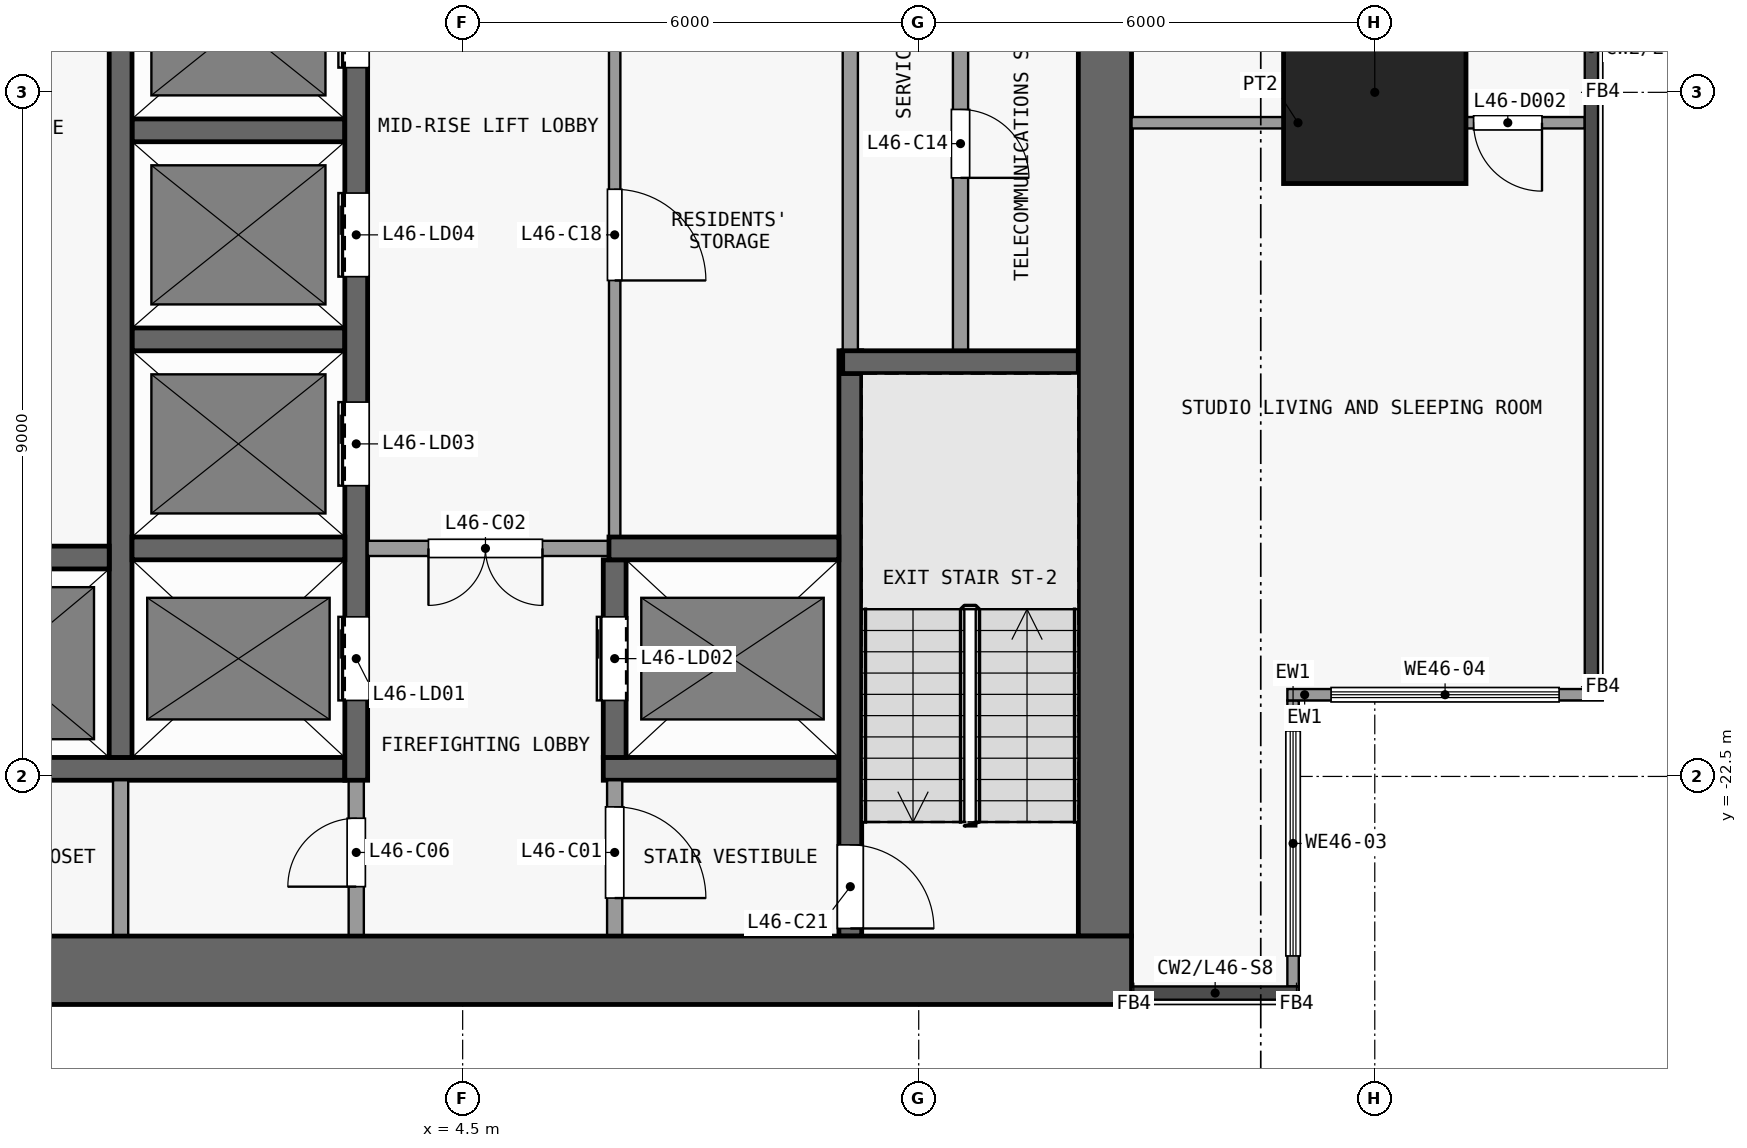
"""IFC4 building model, lengths in metres.
Left out: names, types, materials, properties, quantities, classifications, styles, units other than length and angle.
Written with IfcOpenShell. Run it as: python <this file> out.ifc"""

import sys

from ifc_helpers import new_model, si_unit, direction, frame, frame_2d, origin, origin_2d, place, context, subcontext, project, spatial, rectangle, extrude, element, fill, save


model = new_model("IFC4")
c1 = context("Model", 3, precision=1e-05, world=origin(), true_north=direction((0.0, 1.0)))
c2 = subcontext(c1, "Body", "Model", "MODEL_VIEW")
j1 = project(units=[si_unit("LENGTHUNIT", "METRE"), si_unit("PLANEANGLEUNIT", "RADIAN")], contexts=[c1])
p1 = place(None, origin())
s1 = spatial("IfcSite", under=j1, at=p1, CompositionType="ELEMENT")
p2 = place(p1, origin())
s2 = spatial("IfcBuilding", under=s1, at=p2, CompositionType="ELEMENT")
p3 = place(p2, frame((0.0, 0.0, 185.3)))
s3 = spatial("IfcBuildingStorey", under=s2, at=p3, CompositionType="ELEMENT", Elevation=185.3)
p4 = place(p3, frame((16.5, -13.5, 0.0), z_axis=(0.0, 0.0, 1.0), x_axis=(1.0, 0.0, 0.0)))
e1 = element("IfcColumn", 1, at=p4, inside=s3, PredefinedType="COLUMN", context=c2, shape_type="SweptSolid", body=[
    extrude(rectangle(XDim=2.4, YDim=2.4, at=origin_2d()), origin(), (0.0, 0.0, 1.0), 3.6),
])
p5 = place(p3, frame((-13.3, -25.05, 0.0), z_axis=(0.0, 0.0, 1.0), x_axis=(1.0, 0.0, 0.0)))
e2 = element("IfcWall", 2, at=p5, inside=s3, PredefinedType="SHEAR", context=c2, shape_type="SweptSolid", body=[
    extrude(rectangle(XDim=26.6, YDim=0.9, at=frame_2d((13.3, 0.0))), origin(), (0.0, 0.0, 1.0), 3.3),
])
p6 = place(p3, frame((12.95, -24.6, 0.0), z_axis=(0.0, 0.0, 1.0), x_axis=(0.0, 1.0, 0.0)))
e3 = element("IfcWall", 3, at=p6, inside=s3, PredefinedType="SHEAR", context=c2, shape_type="SweptSolid", body=[
    extrude(rectangle(XDim=16.1, YDim=0.7, at=frame_2d((8.05, 0.0))), origin(), (0.0, 0.0, 1.0), 3.3),
])
p7 = place(p3, frame((-3.25, -22.4, 0.0), z_axis=(0.0, 0.0, 1.0), x_axis=(1.0, 0.0, 0.0)))
e4 = element("IfcWall", 4, at=p7, inside=s3, PredefinedType="SHEAR", context=c2, shape_type="SweptSolid", body=[
    extrude(rectangle(XDim=6.2, YDim=0.3, at=frame_2d((3.1, 0.0))), origin(), (0.0, 0.0, 1.0), 3.3),
])
p8 = place(p3, frame((6.35, -22.4, 0.0), z_axis=(0.0, 0.0, 1.0), x_axis=(1.0, 0.0, 0.0)))
e5 = element("IfcWall", 5, at=p8, inside=s3, PredefinedType="SHEAR", context=c2, shape_type="SweptSolid", body=[
    extrude(rectangle(XDim=3.1, YDim=0.3, at=frame_2d((1.55, 0.0))), origin(), (0.0, 0.0, 1.0), 3.3),
])
p9 = place(p3, frame((-3.175, -19.62, 0.0), z_axis=(0.0, 0.0, 1.0), x_axis=(1.0, 0.0, 0.0)))
e6 = element("IfcWall", 6, at=p9, inside=s3, PredefinedType="SHEAR", context=c2, shape_type="SweptSolid", body=[
    extrude(rectangle(XDim=3.025, YDim=0.3, at=frame_2d((1.513, 0.0))), origin(), (0.0, 0.0, 1.0), 3.3),
])
p10 = place(p3, frame((0.15, -19.5, 0.0), z_axis=(0.0, 0.0, 1.0), x_axis=(1.0, 0.0, 0.0)))
e7 = element("IfcWall", 7, at=p10, inside=s3, PredefinedType="SHEAR", context=c2, shape_type="SweptSolid", body=[
    extrude(rectangle(XDim=2.8, YDim=0.3, at=frame_2d((1.4, 0.0))), origin(), (0.0, 0.0, 1.0), 3.3),
])
p11 = place(p3, frame((6.575, -19.5, 0.0), z_axis=(0.0, 0.0, 1.0), x_axis=(-1.0, 0.0, 0.0)))
e8 = element("IfcWall", 8, at=p11, inside=s3, PredefinedType="PARTITIONING", context=c2, shape_type="SweptSolid", body=[
    extrude(rectangle(XDim=3.325, YDim=0.2, at=frame_2d((1.663, 0.0))), origin(), (0.0, 0.0, 1.0), 3.3),
])
p12 = place(p11, frame((1.025, 0.0, 0.0)))
e9 = element("IfcOpeningElement", 9, at=p12, cuts=e8, PredefinedType="OPENING", context=c2, shape_type="SweptSolid", body=[
    extrude(rectangle(XDim=1.5, YDim=2.1, at=frame_2d((0.75, 1.05))), frame((0.0, 0.11, 0.0), z_axis=(0.0, -1.0, 0.0), x_axis=(1.0, 0.0, 0.0)), (0.0, 0.0, 1.0), 0.22),
])
p13 = place(p3, frame((6.425, -19.5, 0.0), z_axis=(0.0, 0.0, 1.0), x_axis=(1.0, 0.0, 0.0)))
e10 = element("IfcWall", 10, at=p13, inside=s3, PredefinedType="SHEAR", context=c2, shape_type="SweptSolid", body=[
    extrude(rectangle(XDim=3.025, YDim=0.3, at=frame_2d((1.512, 0.0))), origin(), (0.0, 0.0, 1.0), 3.3),
])
p14 = place(p3, frame((9.5, -17.05, 0.0), z_axis=(0.0, 0.0, 1.0), x_axis=(1.0, 0.0, 0.0)))
e11 = element("IfcWall", 11, at=p14, inside=s3, PredefinedType="SHEAR", context=c2, shape_type="SweptSolid", body=[
    extrude(rectangle(XDim=3.1, YDim=0.3, at=frame_2d((1.55, 0.0))), origin(), (0.0, 0.0, 1.0), 3.3),
])
for number, where, z_axis, x_axis in (
    (12, (0.15, -16.75, 0.0), (0.0, 0.0, 1.0), (1.0, 0.0, 0.0)),
    (13, (0.15, -14.0, 0.0), (0.0, 0.0, 1.0), (1.0, 0.0, 0.0)),
):
    element("IfcWall", number, at=place(p3, frame(where, z_axis=z_axis, x_axis=x_axis)), inside=s3, PredefinedType="SHEAR", context=c2, shape_type="SweptSolid", body=[
        extrude(rectangle(XDim=2.8, YDim=0.3, at=frame_2d((1.4, 0.0))), origin(), (0.0, 0.0, 1.0), 3.3),
    ])
p15 = place(p3, frame((0.0, -24.6, 0.0), z_axis=(0.0, 0.0, 1.0), x_axis=(0.0, 1.0, 0.0)))
e14 = element("IfcWall", 14, at=p15, inside=s3, PredefinedType="PARTITIONING", context=c2, shape_type="SweptSolid", body=[
    extrude(rectangle(XDim=2.05, YDim=0.2, at=frame_2d((1.025, 0.0))), origin(), (0.0, 0.0, 1.0), 3.3),
])
p16 = place(p3, frame((0.0, -22.25, 0.0), z_axis=(0.0, 0.0, 1.0), x_axis=(0.0, 1.0, 0.0)))
e15 = element("IfcWall", 15, at=p16, inside=s3, PredefinedType="SHEAR", context=c2, shape_type="SweptSolid", body=[
    extrude(rectangle(XDim=13.75, YDim=0.3, at=frame_2d((6.875, 0.0))), origin(), (0.0, 0.0, 1.0), 3.3),
])
p17 = place(p3, frame((3.1, -24.6, 0.0), z_axis=(0.0, 0.0, 1.0), x_axis=(0.0, 1.0, 0.0)))
e16 = element("IfcWall", 16, at=p17, inside=s3, PredefinedType="PARTITIONING", context=c2, shape_type="SweptSolid", body=[
    extrude(rectangle(XDim=2.05, YDim=0.2, at=frame_2d((1.025, 0.0))), origin(), (0.0, 0.0, 1.0), 3.3),
])
p18 = place(p17, frame((0.65, 0.0, 0.0)))
e17 = element("IfcOpeningElement", 17, at=p18, cuts=e16, PredefinedType="OPENING", context=c2, shape_type="SweptSolid", body=[
    extrude(rectangle(XDim=0.9, YDim=2.1, at=frame_2d((0.45, 1.05))), frame((0.0, 0.11, 0.0), z_axis=(0.0, -1.0, 0.0), x_axis=(1.0, 0.0, 0.0)), (0.0, 0.0, 1.0), 0.22),
])
p19 = place(p3, frame((3.1, -22.55, 0.0), z_axis=(0.0, 0.0, 1.0), x_axis=(0.0, 1.0, 0.0)))
e18 = element("IfcWall", 18, at=p19, inside=s3, PredefinedType="SHEAR", context=c2, shape_type="SweptSolid", body=[
    extrude(rectangle(XDim=14.05, YDim=0.3, at=frame_2d((7.025, 0.0))), origin(), (0.0, 0.0, 1.0), 3.3),
])
p20 = place(p19, frame((1.05, 0.0, 0.0)))
e19 = element("IfcOpeningElement", 19, at=p20, cuts=e18, PredefinedType="OPENING", context=c2, shape_type="SweptSolid", body=[
    extrude(rectangle(XDim=1.1, YDim=2.1, at=frame_2d((0.55, 1.05))), frame((0.0, 0.16, 0.0), z_axis=(0.0, -1.0, 0.0), x_axis=(1.0, 0.0, 0.0)), (0.0, 0.0, 1.0), 0.32),
])
p21 = place(p19, frame((3.875, 0.0, 0.0)))
e20 = element("IfcOpeningElement", 20, at=p21, cuts=e18, PredefinedType="OPENING", context=c2, shape_type="SweptSolid", body=[
    extrude(rectangle(XDim=1.1, YDim=2.1, at=frame_2d((0.55, 1.05))), frame((0.0, 0.16, 0.0), z_axis=(0.0, -1.0, 0.0), x_axis=(1.0, 0.0, 0.0)), (0.0, 0.0, 1.0), 0.32),
])
p22 = place(p19, frame((6.625, 0.0, 0.0)))
e21 = element("IfcOpeningElement", 21, at=p22, cuts=e18, PredefinedType="OPENING", context=c2, shape_type="SweptSolid", body=[
    extrude(rectangle(XDim=1.1, YDim=2.1, at=frame_2d((0.55, 1.05))), frame((0.0, 0.16, 0.0), z_axis=(0.0, -1.0, 0.0), x_axis=(1.0, 0.0, 0.0)), (0.0, 0.0, 1.0), 0.32),
])
p23 = place(p19, frame((9.375, 0.0, 0.0)))
e22 = element("IfcOpeningElement", 22, at=p23, cuts=e18, PredefinedType="OPENING", context=c2, shape_type="SweptSolid", body=[
    extrude(rectangle(XDim=1.1, YDim=2.1, at=frame_2d((0.55, 1.05))), frame((0.0, 0.16, 0.0), z_axis=(0.0, -1.0, 0.0), x_axis=(1.0, 0.0, 0.0)), (0.0, 0.0, 1.0), 0.32),
])
p24 = place(p19, frame((12.125, 0.0, 0.0)))
e23 = element("IfcOpeningElement", 23, at=p24, cuts=e18, PredefinedType="OPENING", context=c2, shape_type="SweptSolid", body=[
    extrude(rectangle(XDim=1.1, YDim=2.1, at=frame_2d((0.55, 1.05))), frame((0.0, 0.16, 0.0), z_axis=(0.0, -1.0, 0.0), x_axis=(1.0, 0.0, 0.0)), (0.0, 0.0, 1.0), 0.32),
])
p25 = place(p3, frame((6.5, -22.55, 0.0), z_axis=(0.0, 0.0, 1.0), x_axis=(0.0, -1.0, 0.0)))
e24 = element("IfcWall", 24, at=p25, inside=s3, PredefinedType="PARTITIONING", context=c2, shape_type="SweptSolid", body=[
    extrude(rectangle(XDim=2.05, YDim=0.2, at=frame_2d((1.025, 0.0))), origin(), (0.0, 0.0, 1.0), 3.3),
])
p26 = place(p25, frame((0.35, 0.0, 0.0)))
e25 = element("IfcOpeningElement", 25, at=p26, cuts=e24, PredefinedType="OPENING", context=c2, shape_type="SweptSolid", body=[
    extrude(rectangle(XDim=1.2, YDim=2.1, at=frame_2d((0.6, 1.05))), frame((0.0, 0.11, 0.0), z_axis=(0.0, -1.0, 0.0), x_axis=(1.0, 0.0, 0.0)), (0.0, 0.0, 1.0), 0.22),
])
p27 = place(p3, frame((6.5, -22.25, 0.0), z_axis=(0.0, 0.0, 1.0), x_axis=(0.0, 1.0, 0.0)))
e26 = element("IfcWall", 26, at=p27, inside=s3, PredefinedType="SHEAR", context=c2, shape_type="SweptSolid", body=[
    extrude(rectangle(XDim=2.6, YDim=0.3, at=frame_2d((1.3, 0.0))), origin(), (0.0, 0.0, 1.0), 3.3),
])
p28 = place(p27, frame((0.75, 0.0, 0.0)))
e27 = element("IfcOpeningElement", 27, at=p28, cuts=e26, PredefinedType="OPENING", context=c2, shape_type="SweptSolid", body=[
    extrude(rectangle(XDim=1.1, YDim=2.1, at=frame_2d((0.55, 1.05))), frame((0.0, 0.16, 0.0), z_axis=(0.0, -1.0, 0.0), x_axis=(1.0, 0.0, 0.0)), (0.0, 0.0, 1.0), 0.32),
])
p29 = place(p3, frame((6.5, -8.5, 0.0), z_axis=(0.0, 0.0, 1.0), x_axis=(0.0, -1.0, 0.0)))
e28 = element("IfcWall", 28, at=p29, inside=s3, PredefinedType="PARTITIONING", context=c2, shape_type="SweptSolid", body=[
    extrude(rectangle(XDim=10.85, YDim=0.15, at=frame_2d((5.425, 0.0))), origin(), (0.0, 0.0, 1.0), 3.3),
])
p30 = place(p29, frame((6.275, 0.0, 0.0)))
e29 = element("IfcOpeningElement", 29, at=p30, cuts=e28, PredefinedType="OPENING", context=c2, shape_type="SweptSolid", body=[
    extrude(rectangle(XDim=1.2, YDim=2.1, at=frame_2d((0.6, 1.05))), frame((0.0, 0.085, 0.0), z_axis=(0.0, -1.0, 0.0), x_axis=(1.0, 0.0, 0.0)), (0.0, 0.0, 1.0), 0.17),
])
p31 = place(p29, frame((0.925, 0.0, 0.0)))
e30 = element("IfcOpeningElement", 30, at=p31, cuts=e28, PredefinedType="OPENING", context=c2, shape_type="SweptSolid", body=[
    extrude(rectangle(XDim=0.9, YDim=2.1, at=frame_2d((0.45, 1.05))), frame((0.0, 0.085, 0.0), z_axis=(0.0, -1.0, 0.0), x_axis=(1.0, 0.0, 0.0)), (0.0, 0.0, 1.0), 0.17),
])
p32 = place(p3, frame((9.6, -16.9, 0.0), z_axis=(0.0, 0.0, 1.0), x_axis=(0.0, -1.0, 0.0)))
e31 = element("IfcWall", 31, at=p32, inside=s3, PredefinedType="SHEAR", context=c2, shape_type="SweptSolid", body=[
    extrude(rectangle(XDim=7.7, YDim=0.3, at=frame_2d((3.85, 0.0))), origin(), (0.0, 0.0, 1.0), 3.3),
])
p33 = place(p32, frame((6.5, 0.0, 0.0)))
e32 = element("IfcOpeningElement", 32, at=p33, cuts=e31, PredefinedType="OPENING", context=c2, shape_type="SweptSolid", body=[
    extrude(rectangle(XDim=1.1, YDim=2.1, at=frame_2d((0.55, 1.05))), frame((0.0, 0.16, 0.0), z_axis=(0.0, -1.0, 0.0), x_axis=(1.0, 0.0, 0.0)), (0.0, 0.0, 1.0), 0.32),
])
p34 = place(p3, frame((9.6, -16.9, 0.0), z_axis=(0.0, 0.0, 1.0), x_axis=(0.0, 1.0, 0.0)))
e33 = element("IfcWall", 33, at=p34, inside=s3, PredefinedType="PARTITIONING", context=c2, shape_type="SweptSolid", body=[
    extrude(rectangle(XDim=8.4, YDim=0.2, at=frame_2d((4.2, 0.0))), origin(), (0.0, 0.0, 1.0), 3.3),
])
p35 = place(p3, frame((11.05, -11.2, 0.0), z_axis=(0.0, 0.0, 1.0), x_axis=(0.0, -1.0, 0.0)))
e34 = element("IfcWall", 34, at=p35, inside=s3, PredefinedType="PARTITIONING", context=c2, shape_type="SweptSolid", body=[
    extrude(rectangle(XDim=5.7, YDim=0.2, at=frame_2d((2.85, 0.0))), origin(), (0.0, 0.0, 1.0), 3.3),
])
p36 = place(p35, frame((2.525, 0.0, 0.0)))
e35 = element("IfcOpeningElement", 35, at=p36, cuts=e34, PredefinedType="OPENING", context=c2, shape_type="SweptSolid", body=[
    extrude(rectangle(XDim=0.9, YDim=2.1, at=frame_2d((0.45, 1.05))), frame((0.0, 0.11, 0.0), z_axis=(0.0, -1.0, 0.0), x_axis=(1.0, 0.0, 0.0)), (0.0, 0.0, 1.0), 0.22),
])
p37 = place(p3, frame((15.425, -21.5, 0.0), z_axis=(0.0, 0.0, 1.0), x_axis=(0.0, -1.0, 0.0)))
e36 = element("IfcWall", 36, at=p37, inside=s3, PredefinedType="SOLIDWALL", context=c2, shape_type="SweptSolid", body=[
    extrude(rectangle(XDim=3.762, YDim=0.15, at=frame_2d((1.881, 0.0))), origin(), (0.0, 0.0, 1.0), 3.3),
])
p38 = place(p37, frame((0.401, 0.0, 0.9)))
e37 = element("IfcOpeningElement", 37, at=p38, cuts=e36, PredefinedType="OPENING", context=c2, shape_type="SweptSolid", body=[
    extrude(rectangle(XDim=2.96, YDim=2.4, at=frame_2d((1.48, 1.2))), frame((0.0, 0.085, 0.0), z_axis=(0.0, -1.0, 0.0), x_axis=(1.0, 0.0, 0.0)), (0.0, 0.0, 1.0), 0.17),
])
p39 = place(p3, frame((19.5, -21.425, 0.0), z_axis=(0.0, 0.0, 1.0), x_axis=(-1.0, 0.0, 0.0)))
e38 = element("IfcWall", 38, at=p39, inside=s3, PredefinedType="SOLIDWALL", context=c2, shape_type="SweptSolid", body=[
    extrude(rectangle(XDim=4.15, YDim=0.15, at=frame_2d((2.075, 0.0))), origin(), (0.0, 0.0, 1.0), 3.3),
])
p40 = place(p39, frame((0.575, 0.0, 0.9)))
e39 = element("IfcOpeningElement", 39, at=p40, cuts=e38, PredefinedType="OPENING", context=c2, shape_type="SweptSolid", body=[
    extrude(rectangle(XDim=3.0, YDim=2.4, at=frame_2d((1.5, 1.2))), frame((0.0, 0.085, 0.0), z_axis=(0.0, -1.0, 0.0), x_axis=(1.0, 0.0, 0.0)), (0.0, 0.0, 1.0), 0.17),
])
p41 = place(p3, frame((13.3, -13.9, 0.0), z_axis=(0.0, 0.0, 1.0), x_axis=(1.0, 0.0, 0.0)))
e40 = element("IfcWall", 40, at=p41, inside=s3, PredefinedType="PARTITIONING", context=c2, shape_type="SweptSolid", body=[
    extrude(rectangle(XDim=5.962, YDim=0.15, at=frame_2d((2.981, 0.0))), origin(), (0.0, 0.0, 1.0), 3.3),
])
p42 = place(p41, frame((4.5, 0.0, 0.0)))
e41 = element("IfcOpeningElement", 41, at=p42, cuts=e40, PredefinedType="OPENING", context=c2, shape_type="SweptSolid", body=[
    extrude(rectangle(XDim=0.9, YDim=2.1, at=frame_2d((0.45, 1.05))), frame((0.0, 0.085, 0.0), z_axis=(0.0, -1.0, 0.0), x_axis=(1.0, 0.0, 0.0)), (0.0, 0.0, 1.0), 0.17),
])
p43 = place(p3, frame((16.3, -13.825, 0.0), z_axis=(0.0, 0.0, 1.0), x_axis=(0.0, 1.0, 0.0)))
e42 = element("IfcWall", 42, at=p43, inside=s3, PredefinedType="PARTITIONING", context=c2, shape_type="SweptSolid", body=[
    extrude(rectangle(XDim=2.85, YDim=0.15, at=frame_2d((1.425, 0.0))), origin(), (0.0, 0.0, 1.0), 3.3),
])
p44 = place(p20, origin())
e43 = element("IfcDoor", 43, at=p44, inside=s3, OperationType="DOUBLE_DOOR_SLIDING", PredefinedType="DOOR", context=c2, shape_type="SweptSolid", body=[
    extrude(rectangle(XDim=1.1, YDim=2.1, at=frame_2d((0.55, 1.05))), frame((0.0, 0.025, 0.0), z_axis=(0.0, -1.0, 0.0), x_axis=(1.0, 0.0, 0.0)), (0.0, 0.0, 1.0), 0.05),
])
fill(e19, e43)
p45 = place(p28, origin())
e44 = element("IfcDoor", 44, at=p45, inside=s3, OperationType="DOUBLE_DOOR_SLIDING", PredefinedType="DOOR", context=c2, shape_type="SweptSolid", body=[
    extrude(rectangle(XDim=1.1, YDim=2.1, at=frame_2d((0.55, 1.05))), frame((0.0, 0.025, 0.0), z_axis=(0.0, -1.0, 0.0), x_axis=(1.0, 0.0, 0.0)), (0.0, 0.0, 1.0), 0.05),
])
fill(e27, e44)
p46 = place(p21, origin())
e45 = element("IfcDoor", 45, at=p46, inside=s3, OperationType="DOUBLE_DOOR_SLIDING", PredefinedType="DOOR", context=c2, shape_type="SweptSolid", body=[
    extrude(rectangle(XDim=1.1, YDim=2.1, at=frame_2d((0.55, 1.05))), frame((0.0, 0.025, 0.0), z_axis=(0.0, -1.0, 0.0), x_axis=(1.0, 0.0, 0.0)), (0.0, 0.0, 1.0), 0.05),
])
fill(e20, e45)
p47 = place(p22, origin())
e46 = element("IfcDoor", 46, at=p47, inside=s3, OperationType="DOUBLE_DOOR_SLIDING", PredefinedType="DOOR", context=c2, shape_type="SweptSolid", body=[
    extrude(rectangle(XDim=1.1, YDim=2.1, at=frame_2d((0.55, 1.05))), frame((0.0, 0.025, 0.0), z_axis=(0.0, -1.0, 0.0), x_axis=(1.0, 0.0, 0.0)), (0.0, 0.0, 1.0), 0.05),
])
fill(e21, e46)
p48 = place(p23, origin())
e47 = element("IfcDoor", 47, at=p48, inside=s3, OperationType="DOUBLE_DOOR_SLIDING", PredefinedType="DOOR", context=c2, shape_type="SweptSolid", body=[
    extrude(rectangle(XDim=1.1, YDim=2.1, at=frame_2d((0.55, 1.05))), frame((0.0, 0.025, 0.0), z_axis=(0.0, -1.0, 0.0), x_axis=(1.0, 0.0, 0.0)), (0.0, 0.0, 1.0), 0.05),
])
fill(e22, e47)
p49 = place(p26, origin())
e48 = element("IfcDoor", 48, at=p49, inside=s3, OperationType="SINGLE_SWING_RIGHT", PredefinedType="DOOR", context=c2, shape_type="SweptSolid", body=[
    extrude(rectangle(XDim=1.2, YDim=2.1, at=frame_2d((0.6, 1.05))), frame((0.0, 0.025, 0.0), z_axis=(0.0, -1.0, 0.0), x_axis=(1.0, 0.0, 0.0)), (0.0, 0.0, 1.0), 0.05),
])
fill(e25, e48)
p50 = place(p12, origin())
e49 = element("IfcDoor", 49, at=p50, inside=s3, OperationType="DOUBLE_DOOR_SINGLE_SWING", PredefinedType="DOOR", context=c2, shape_type="SweptSolid", body=[
    extrude(rectangle(XDim=1.5, YDim=2.1, at=frame_2d((0.75, 1.05))), frame((0.0, 0.025, 0.0), z_axis=(0.0, -1.0, 0.0), x_axis=(1.0, 0.0, 0.0)), (0.0, 0.0, 1.0), 0.05),
])
fill(e9, e49)
p51 = place(p18, origin())
e50 = element("IfcDoor", 50, at=p51, inside=s3, OperationType="SINGLE_SWING_LEFT", PredefinedType="DOOR", context=c2, shape_type="SweptSolid", body=[
    extrude(rectangle(XDim=0.9, YDim=2.1, at=frame_2d((0.45, 1.05))), frame((0.0, 0.025, 0.0), z_axis=(0.0, -1.0, 0.0), x_axis=(1.0, 0.0, 0.0)), (0.0, 0.0, 1.0), 0.05),
])
fill(e17, e50)
p52 = place(p36, origin())
e51 = element("IfcDoor", 51, at=p52, inside=s3, OperationType="SINGLE_SWING_RIGHT", PredefinedType="DOOR", context=c2, shape_type="SweptSolid", body=[
    extrude(rectangle(XDim=0.9, YDim=2.1, at=frame_2d((0.45, 1.05))), frame((0.0, 0.025, 0.0), z_axis=(0.0, -1.0, 0.0), x_axis=(1.0, 0.0, 0.0)), (0.0, 0.0, 1.0), 0.05),
])
fill(e35, e51)
p53 = place(p30, origin())
e52 = element("IfcDoor", 52, at=p53, inside=s3, OperationType="SINGLE_SWING_RIGHT", PredefinedType="DOOR", context=c2, shape_type="SweptSolid", body=[
    extrude(rectangle(XDim=1.2, YDim=2.1, at=frame_2d((0.6, 1.05))), frame((0.0, 0.025, 0.0), z_axis=(0.0, -1.0, 0.0), x_axis=(1.0, 0.0, 0.0)), (0.0, 0.0, 1.0), 0.05),
])
fill(e29, e52)
p54 = place(p33, origin())
e53 = element("IfcDoor", 53, at=p54, inside=s3, OperationType="SINGLE_SWING_RIGHT", PredefinedType="DOOR", context=c2, shape_type="SweptSolid", body=[
    extrude(rectangle(XDim=1.1, YDim=2.1, at=frame_2d((0.55, 1.05))), frame((0.0, 0.025, 0.0), z_axis=(0.0, -1.0, 0.0), x_axis=(1.0, 0.0, 0.0)), (0.0, 0.0, 1.0), 0.05),
])
fill(e32, e53)
p55 = place(p38, origin())
e54 = element("IfcWindow", 54, at=p55, inside=s3, PartitioningType="SINGLE_PANEL", PredefinedType="WINDOW", context=c2, shape_type="SweptSolid", body=[
    extrude(rectangle(XDim=2.96, YDim=2.4, at=frame_2d((1.48, 1.2))), frame((0.0, 0.03, 0.0), z_axis=(0.0, -1.0, 0.0), x_axis=(1.0, 0.0, 0.0)), (0.0, 0.0, 1.0), 0.06),
])
fill(e37, e54)
p56 = place(p40, origin())
e55 = element("IfcWindow", 55, at=p56, inside=s3, PartitioningType="SINGLE_PANEL", PredefinedType="WINDOW", context=c2, shape_type="SweptSolid", body=[
    extrude(rectangle(XDim=3.0, YDim=2.4, at=frame_2d((1.5, 1.2))), frame((0.0, 0.03, 0.0), z_axis=(0.0, -1.0, 0.0), x_axis=(1.0, 0.0, 0.0)), (0.0, 0.0, 1.0), 0.06),
])
fill(e39, e55)
p57 = place(p42, origin())
e56 = element("IfcDoor", 56, at=p57, inside=s3, OperationType="SINGLE_SWING_RIGHT", PredefinedType="DOOR", context=c2, shape_type="SweptSolid", body=[
    extrude(rectangle(XDim=0.9, YDim=2.1, at=frame_2d((0.45, 1.05))), frame((0.0, 0.025, 0.0), z_axis=(0.0, -1.0, 0.0), x_axis=(1.0, 0.0, 0.0)), (0.0, 0.0, 1.0), 0.05),
])
fill(e41, e56)
save(model, sys.argv[1])
